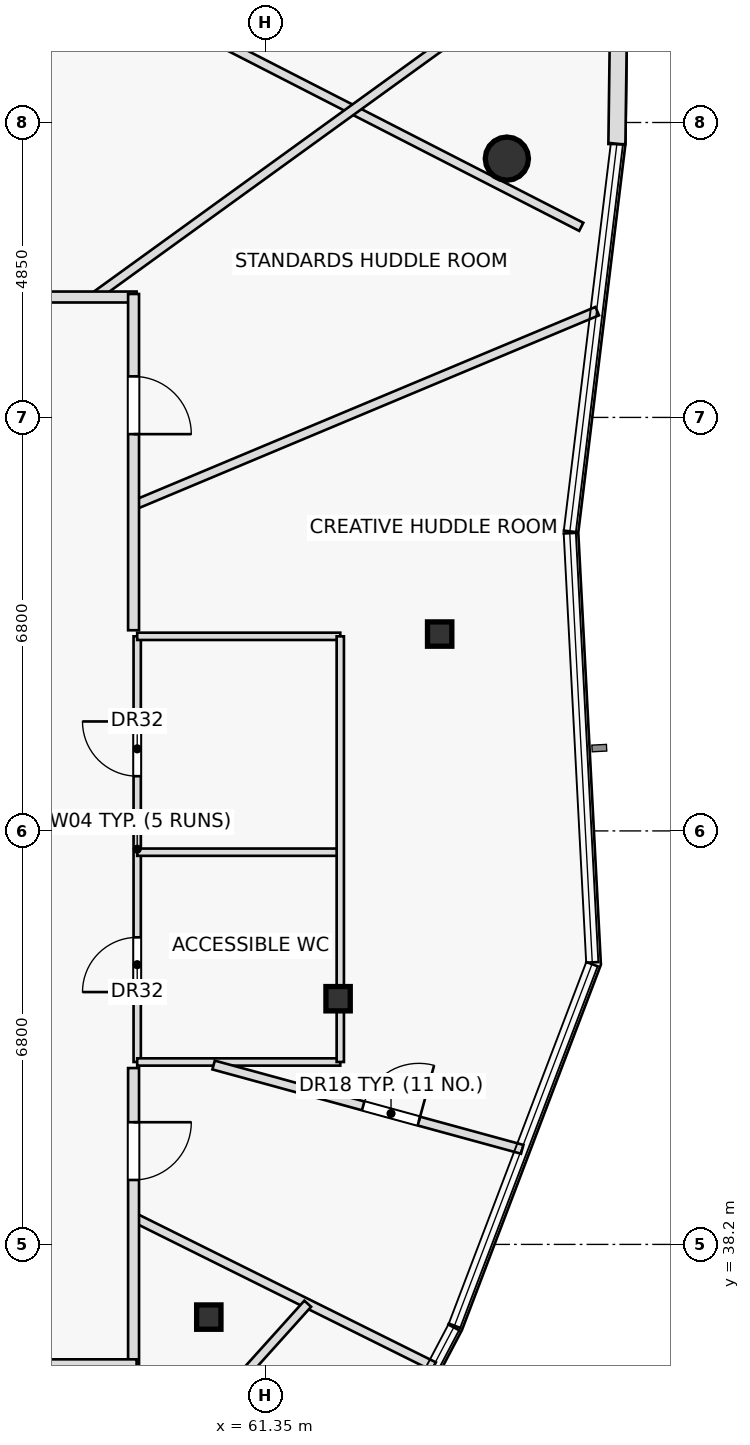
"""IFC4 building model, lengths in metres.
Left out: names, types, materials, properties, quantities, classifications, styles, units other than length and angle.
Written with IfcOpenShell. Run it as: python <this file> out.ifc"""

import sys

from ifc_helpers import new_model, si_unit, direction, frame, frame_2d, origin, origin_2d, place, context, subcontext, project, spatial, rectangle, hollow_rectangle, hollow_circle, extrude, element, fill, save


model = new_model("IFC4")
c1 = context("Model", 3, precision=1e-05, world=origin(), true_north=direction((0.0, 1.0)))
c2 = subcontext(c1, "Body", "Model", "MODEL_VIEW")
j1 = project(units=[si_unit("LENGTHUNIT", "METRE"), si_unit("PLANEANGLEUNIT", "RADIAN")], contexts=[c1])
p1 = place(None, origin())
s1 = spatial("IfcSite", under=j1, at=p1, CompositionType="ELEMENT")
p2 = place(p1, origin())
s2 = spatial("IfcBuilding", under=s1, at=p2, CompositionType="ELEMENT")
p3 = place(p2, frame((0.0, 0.0, 321.5)))
s3 = spatial("IfcBuildingStorey", under=s2, at=p3, CompositionType="ELEMENT", Elevation=321.5)
for number, where, z_axis, x_axis in (
    (1, (60.417, 37.004, 0.0), (0.0, 0.0, 1.0), (1.0, 0.0, 0.0)),
    (2, (62.544, 42.24, 0.0), (0.0, 0.0, 1.0), (1.0, 0.0, 0.0)),
    (3, (64.214, 48.237, 0.0), (0.0, 0.0, 1.0), (1.0, 0.0, 0.0)),
):
    element("IfcColumn", number, at=place(p3, frame(where, z_axis=z_axis, x_axis=x_axis)), inside=s3, PredefinedType="COLUMN", context=c2, shape_type="SweptSolid", body=[
        extrude(hollow_rectangle(XDim=0.4, YDim=0.4, WallThickness=0.025, at=origin_2d()), origin(), (0.0, 0.0, 1.0), 3.55),
    ])
p4 = place(p3, frame((65.32, 56.056, 0.0), z_axis=(0.0, 0.0, 1.0), x_axis=(1.0, 0.0, 0.0)))
e4 = element("IfcColumn", 4, at=p4, inside=s3, PredefinedType="COLUMN", context=c2, shape_type="SweptSolid", body=[
    extrude(hollow_circle(Radius=0.355, WallThickness=0.032, at=origin_2d()), origin(), (0.0, 0.0, 1.0), 3.55),
])
p5 = place(p3, frame((66.543, 54.934, 0.0), z_axis=(0.0, 0.0, 1.0), x_axis=(-0.889966951661, 0.456025026673, 0.0)))
e5 = element("IfcWall", 5, at=p5, inside=s3, PredefinedType="PARTITIONING", context=c2, shape_type="SweptSolid", body=[
    extrude(rectangle(XDim=10.879, YDim=0.15, at=frame_2d((5.439, 0.0))), origin(), (0.0, 0.0, 1.0), 3.125),
])
p6 = place(p3, frame((59.24, 41.2, 0.0), z_axis=(0.0, 0.0, 1.0), x_axis=(0.0, 1.0, 0.0)))
e6 = element("IfcWall", 6, at=p6, inside=s3, PredefinedType="PARTITIONING", context=c2, shape_type="SweptSolid", body=[
    extrude(rectangle(XDim=7.0, YDim=0.12, at=frame_2d((3.5, 0.0))), origin(), (0.0, 0.0, 1.0), 3.55),
])
p7 = place(p6, frame((1.15, 0.0, 0.0)))
e7 = element("IfcOpeningElement", 7, at=p7, cuts=e6, PredefinedType="OPENING", context=c2, shape_type="SweptSolid", body=[
    extrude(rectangle(XDim=0.9, YDim=2.05, at=frame_2d((0.45, 1.025))), frame((0.0, 0.07, 0.0), z_axis=(0.0, -1.0, 0.0), x_axis=(1.0, 0.0, 0.0)), (0.0, 0.0, 1.0), 0.14),
])
p8 = place(p6, frame((4.7, 0.0, 0.0)))
e8 = element("IfcOpeningElement", 8, at=p8, cuts=e6, PredefinedType="OPENING", context=c2, shape_type="SweptSolid", body=[
    extrude(rectangle(XDim=0.9, YDim=2.05, at=frame_2d((0.45, 1.025))), frame((0.0, 0.07, 0.0), z_axis=(0.0, -1.0, 0.0), x_axis=(1.0, 0.0, 0.0)), (0.0, 0.0, 1.0), 0.14),
])
p9 = place(p3, frame((59.24, 41.2, 0.0), z_axis=(0.0, 0.0, 1.0), x_axis=(1.0, 0.0, 0.0)))
e9 = element("IfcWall", 9, at=p9, inside=s3, PredefinedType="PARTITIONING", context=c2, shape_type="SweptSolid", body=[
    extrude(rectangle(XDim=3.34, YDim=0.12, at=frame_2d((1.67, 0.0))), origin(), (0.0, 0.0, 1.0), 3.075),
])
for number, where, z_axis, x_axis in (
    (10, (59.24, 44.65, 0.0), (0.0, 0.0, 1.0), (1.0, 0.0, 0.0)),
    (11, (59.24, 48.2, 0.0), (0.0, 0.0, 1.0), (1.0, 0.0, 0.0)),
):
    element("IfcWall", number, at=place(p3, frame(where, z_axis=z_axis, x_axis=x_axis)), inside=s3, PredefinedType="PARTITIONING", context=c2, shape_type="SweptSolid", body=[
        extrude(rectangle(XDim=3.34, YDim=0.12, at=frame_2d((1.67, 0.0))), origin(), (0.0, 0.0, 1.0), 3.55),
    ])
p10 = place(p3, frame((62.58, 41.2, 0.0), z_axis=(0.0, 0.0, 1.0), x_axis=(0.0, 1.0, 0.0)))
e12 = element("IfcWall", 12, at=p10, inside=s3, PredefinedType="PARTITIONING", context=c2, shape_type="SweptSolid", body=[
    extrude(rectangle(XDim=7.0, YDim=0.12, at=frame_2d((3.5, 0.0))), origin(), (0.0, 0.0, 1.0), 3.125),
])
p11 = place(p3, frame((54.821, 36.22, 0.0), z_axis=(0.0, 0.0, 1.0), x_axis=(0.69220120833, -0.721704570573, 0.0)))
e13 = element("IfcWall", 13, at=p11, inside=s3, PredefinedType="PARTITIONING", context=c2, shape_type="SweptSolid", body=[
    extrude(rectangle(XDim=8.118, YDim=0.15, at=frame_2d((4.059, 0.0))), origin(), (0.0, 0.0, 1.0), 3.075),
])
p12 = place(p3, frame((59.18, 38.648, 0.0), z_axis=(0.0, 0.0, 1.0), x_axis=(0.895495908624, -0.445069744689, 0.0)))
e14 = element("IfcWall", 14, at=p12, inside=s3, PredefinedType="PARTITIONING", context=c2, shape_type="SweptSolid", body=[
    extrude(rectangle(XDim=5.515, YDim=0.15, at=frame_2d((2.758, 0.0))), origin(), (0.0, 0.0, 1.0), 3.125),
])
p13 = place(p3, frame((60.496, 41.15, 0.0), z_axis=(0.0, 0.0, 1.0), x_axis=(0.964681322474, -0.263419714655, 0.0)))
e15 = element("IfcWall", 15, at=p13, inside=s3, PredefinedType="PARTITIONING", context=c2, shape_type="SweptSolid", body=[
    extrude(rectangle(XDim=5.261, YDim=0.15, at=frame_2d((2.631, 0.0))), origin(), (0.0, 0.0, 1.0), 3.125),
])
p14 = place(p13, frame((2.55, 0.0, 0.0)))
e16 = element("IfcOpeningElement", 16, at=p14, cuts=e15, PredefinedType="OPENING", context=c2, shape_type="SweptSolid", body=[
    extrude(rectangle(XDim=0.95, YDim=2.05, at=frame_2d((0.475, 1.025))), frame((0.0, 0.085, 0.0), z_axis=(0.0, -1.0, 0.0), x_axis=(1.0, 0.0, 0.0)), (0.0, 0.0, 1.0), 0.17),
])
p15 = place(p3, frame((59.18, 50.354, 0.0), z_axis=(0.0, 0.0, 1.0), x_axis=(0.922338705377, 0.38638233987, 0.0)))
e17 = element("IfcWall", 17, at=p15, inside=s3, PredefinedType="PARTITIONING", context=c2, shape_type="SweptSolid", body=[
    extrude(rectangle(XDim=8.267, YDim=0.15, at=frame_2d((4.134, 0.0))), origin(), (0.0, 0.0, 1.0), 3.125),
])
p16 = place(p3, frame((58.532, 53.78, 0.0), z_axis=(0.0, 0.0, 1.0), x_axis=(0.810096856505, 0.58629607118, 0.0)))
e18 = element("IfcWall", 18, at=p16, inside=s3, PredefinedType="PARTITIONING", context=c2, shape_type="SweptSolid", body=[
    extrude(rectangle(XDim=9.768, YDim=0.15, at=frame_2d((4.884, 0.0))), origin(), (0.0, 0.0, 1.0), 3.125),
])
p17 = place(p3, frame((58.08, 32.822, 0.0), z_axis=(0.0, 0.0, 1.0), x_axis=(0.669174172191, 0.743105596314, 0.0)))
e19 = element("IfcWall", 19, at=p17, inside=s3, PredefinedType="PARTITIONING", context=c2, shape_type="SweptSolid", body=[
    extrude(rectangle(XDim=5.924, YDim=0.15, at=frame_2d((2.962, 0.0))), origin(), (0.0, 0.0, 1.0), 3.125),
])
p18 = place(p17, frame((2.487, 0.0, 0.0)))
e20 = element("IfcOpeningElement", 20, at=p18, cuts=e19, PredefinedType="OPENING", context=c2, shape_type="SweptSolid", body=[
    extrude(rectangle(XDim=0.95, YDim=2.05, at=frame_2d((0.475, 1.025))), frame((0.0, 0.085, 0.0), z_axis=(0.0, -1.0, 0.0), x_axis=(1.0, 0.0, 0.0)), (0.0, 0.0, 1.0), 0.17),
])
p19 = place(p3, frame((54.3, 53.78, 0.0), z_axis=(0.0, 0.0, 1.0), x_axis=(1.0, 0.0, 0.0)))
e21 = element("IfcWall", 21, at=p19, inside=s3, PredefinedType="PARTITIONING", context=c2, shape_type="SweptSolid", body=[
    extrude(rectangle(XDim=4.93, YDim=0.18, at=frame_2d((2.465, 0.0))), origin(), (0.0, 0.0, 1.0), 3.55),
])
p20 = place(p19, frame((1.841, 0.0, 0.0)))
e22 = element("IfcOpeningElement", 22, at=p20, cuts=e21, PredefinedType="OPENING", context=c2, shape_type="SweptSolid", body=[
    extrude(rectangle(XDim=0.95, YDim=2.05, at=frame_2d((0.475, 1.025))), frame((0.0, 0.1, 0.0), z_axis=(0.0, -1.0, 0.0), x_axis=(1.0, 0.0, 0.0)), (0.0, 0.0, 1.0), 0.2),
])
p21 = place(p3, frame((59.18, 53.83, 0.0), z_axis=(0.0, 0.0, 1.0), x_axis=(0.0, -1.0, 0.0)))
e23 = element("IfcWall", 23, at=p21, inside=s3, PredefinedType="PARTITIONING", context=c2, shape_type="SweptSolid", body=[
    extrude(rectangle(XDim=5.53, YDim=0.18, at=frame_2d((2.765, 0.0))), origin(), (0.0, 0.0, 1.0), 3.55),
])
p22 = place(p21, frame((1.355, 0.0, 0.0)))
e24 = element("IfcOpeningElement", 24, at=p22, cuts=e23, PredefinedType="OPENING", context=c2, shape_type="SweptSolid", body=[
    extrude(rectangle(XDim=0.95, YDim=2.05, at=frame_2d((0.475, 1.025))), frame((0.0, 0.1, 0.0), z_axis=(0.0, -1.0, 0.0), x_axis=(1.0, 0.0, 0.0)), (0.0, 0.0, 1.0), 0.2),
])
p23 = place(p3, frame((59.18, 41.1, 0.0), z_axis=(0.0, 0.0, 1.0), x_axis=(0.0, -1.0, 0.0)))
e25 = element("IfcWall", 25, at=p23, inside=s3, PredefinedType="PARTITIONING", context=c2, shape_type="SweptSolid", body=[
    extrude(rectangle(XDim=4.93, YDim=0.18, at=frame_2d((2.465, 0.0))), origin(), (0.0, 0.0, 1.0), 3.325),
])
p24 = place(p23, frame((0.89, 0.0, 0.0)))
e26 = element("IfcOpeningElement", 26, at=p24, cuts=e25, PredefinedType="OPENING", context=c2, shape_type="SweptSolid", body=[
    extrude(rectangle(XDim=0.95, YDim=2.05, at=frame_2d((0.475, 1.025))), frame((0.0, 0.1, 0.0), z_axis=(0.0, -1.0, 0.0), x_axis=(1.0, 0.0, 0.0)), (0.0, 0.0, 1.0), 0.2),
])
p25 = place(p3, frame((59.23, 36.22, 0.0), z_axis=(0.0, 0.0, 1.0), x_axis=(-1.0, 0.0, 0.0)))
e27 = element("IfcWall", 27, at=p25, inside=s3, PredefinedType="PARTITIONING", context=c2, shape_type="SweptSolid", body=[
    extrude(rectangle(XDim=19.48, YDim=0.18, at=frame_2d((9.74, 0.0))), origin(), (0.0, 0.0, 1.0), 3.075),
])
p26 = place(p25, frame((1.779, 0.0, 0.0)))
e28 = element("IfcOpeningElement", 28, at=p26, cuts=e27, PredefinedType="OPENING", context=c2, shape_type="SweptSolid", body=[
    extrude(rectangle(XDim=0.95, YDim=2.05, at=frame_2d((0.475, 1.025))), frame((0.0, 0.1, 0.0), z_axis=(0.0, -1.0, 0.0), x_axis=(1.0, 0.0, 0.0)), (0.0, 0.0, 1.0), 0.2),
])
p27 = place(p25, frame((7.231, 0.0, 0.0)))
e29 = element("IfcOpeningElement", 29, at=p27, cuts=e27, PredefinedType="OPENING", context=c2, shape_type="SweptSolid", body=[
    extrude(rectangle(XDim=0.95, YDim=2.05, at=frame_2d((0.475, 1.025))), frame((0.0, 0.1, 0.0), z_axis=(0.0, -1.0, 0.0), x_axis=(1.0, 0.0, 0.0)), (0.0, 0.0, 1.0), 0.2),
])
p28 = place(p25, frame((13.719, 0.0, 0.0)))
e30 = element("IfcOpeningElement", 30, at=p28, cuts=e27, PredefinedType="OPENING", context=c2, shape_type="SweptSolid", body=[
    extrude(rectangle(XDim=0.95, YDim=2.05, at=frame_2d((0.475, 1.025))), frame((0.0, 0.1, 0.0), z_axis=(0.0, -1.0, 0.0), x_axis=(1.0, 0.0, 0.0)), (0.0, 0.0, 1.0), 0.2),
])
p29 = place(p25, frame((17.799, 0.0, 0.0)))
e31 = element("IfcOpeningElement", 31, at=p29, cuts=e27, PredefinedType="OPENING", context=c2, shape_type="SweptSolid", body=[
    extrude(rectangle(XDim=0.95, YDim=2.05, at=frame_2d((0.475, 1.025))), frame((0.0, 0.1, 0.0), z_axis=(0.0, -1.0, 0.0), x_axis=(1.0, 0.0, 0.0)), (0.0, 0.0, 1.0), 0.2),
])
p30 = place(p3, frame((67.129, 56.295, 0.0), z_axis=(0.0, 0.0, 1.0), x_axis=(0.013008693045, 0.999915383373, 0.0)))
e32 = element("IfcWall", 32, at=p30, inside=s3, PredefinedType="STANDARD", context=c2, shape_type="SweptSolid", body=[
    extrude(rectangle(XDim=1.67, YDim=0.28, at=frame_2d((0.835, 0.0))), origin(), (0.0, 0.0, 1.0), 3.55),
])
p31 = place(p7, origin())
e33 = element("IfcDoor", 33, at=p31, inside=s3, OperationType="SINGLE_SWING_LEFT", PredefinedType="DOOR", context=c2, shape_type="SweptSolid", body=[
    extrude(rectangle(XDim=0.9, YDim=2.05, at=frame_2d((0.45, 1.025))), frame((0.0, 0.025, 0.0), z_axis=(0.0, -1.0, 0.0), x_axis=(1.0, 0.0, 0.0)), (0.0, 0.0, 1.0), 0.05),
])
fill(e7, e33)
p32 = place(p8, origin())
e34 = element("IfcDoor", 34, at=p32, inside=s3, OperationType="SINGLE_SWING_RIGHT", PredefinedType="DOOR", context=c2, shape_type="SweptSolid", body=[
    extrude(rectangle(XDim=0.9, YDim=2.05, at=frame_2d((0.45, 1.025))), frame((0.0, 0.025, 0.0), z_axis=(0.0, -1.0, 0.0), x_axis=(1.0, 0.0, 0.0)), (0.0, 0.0, 1.0), 0.05),
])
fill(e8, e34)
p33 = place(p14, origin())
e35 = element("IfcDoor", 35, at=p33, inside=s3, OperationType="SINGLE_SWING_RIGHT", PredefinedType="DOOR", context=c2, shape_type="SweptSolid", body=[
    extrude(rectangle(XDim=0.95, YDim=2.05, at=frame_2d((0.475, 1.025))), frame((0.0, 0.025, 0.0), z_axis=(0.0, -1.0, 0.0), x_axis=(1.0, 0.0, 0.0)), (0.0, 0.0, 1.0), 0.05),
])
fill(e16, e35)
p34 = place(p22, origin())
e36 = element("IfcDoor", 36, at=p34, inside=s3, OperationType="SINGLE_SWING_RIGHT", PredefinedType="DOOR", context=c2, shape_type="SweptSolid", body=[
    extrude(rectangle(XDim=0.95, YDim=2.05, at=frame_2d((0.475, 1.025))), frame((0.0, 0.025, 0.0), z_axis=(0.0, -1.0, 0.0), x_axis=(1.0, 0.0, 0.0)), (0.0, 0.0, 1.0), 0.05),
])
fill(e24, e36)
p35 = place(p24, origin())
e37 = element("IfcDoor", 37, at=p35, inside=s3, OperationType="SINGLE_SWING_LEFT", PredefinedType="DOOR", context=c2, shape_type="SweptSolid", body=[
    extrude(rectangle(XDim=0.95, YDim=2.05, at=frame_2d((0.475, 1.025))), frame((0.0, 0.025, 0.0), z_axis=(0.0, -1.0, 0.0), x_axis=(1.0, 0.0, 0.0)), (0.0, 0.0, 1.0), 0.05),
])
fill(e26, e37)
save(model, sys.argv[1])
